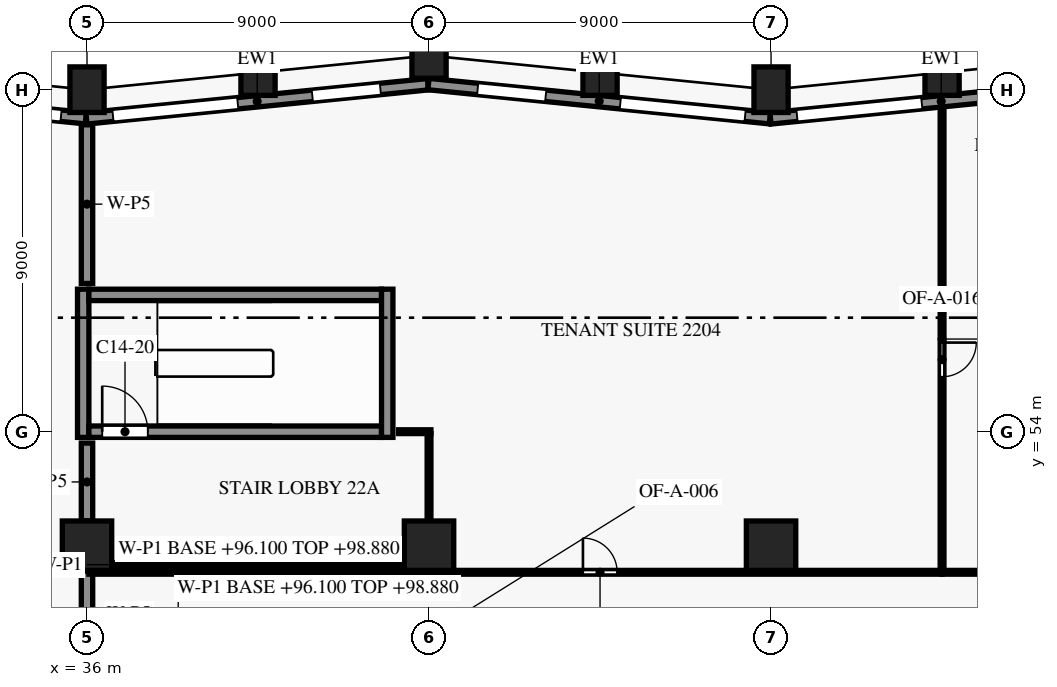
"""IFC4 building model, lengths in metres.
Left out: names, types, materials, properties, quantities, classifications, styles, units other than length and angle.
Written with IfcOpenShell. Run it as: python <this file> out.ifc"""

import sys

from ifc_helpers import new_model, si_unit, direction, frame, frame_2d, origin, origin_2d, place, context, subcontext, project, spatial, rectangle, extrude, element, fill, save


model = new_model("IFC4")
c1 = context("Model", 3, precision=1e-05, world=origin(), true_north=direction((0.0, 1.0)))
c2 = subcontext(c1, "Body", "Model", "MODEL_VIEW")
j1 = project(units=[si_unit("LENGTHUNIT", "METRE"), si_unit("PLANEANGLEUNIT", "RADIAN")], contexts=[c1])
p1 = place(None, origin())
s1 = spatial("IfcSite", under=j1, at=p1, CompositionType="ELEMENT")
p2 = place(p1, origin())
s2 = spatial("IfcBuilding", under=s1, at=p2, CompositionType="ELEMENT")
p3 = place(p2, frame((0.0, 0.0, 96.1)))
s3 = spatial("IfcBuildingStorey", under=s2, at=p3, CompositionType="ELEMENT", Elevation=96.1)
for number, where, z_axis, x_axis in (
    (1, (58.5, 63.45, 0.0), (0.0, 0.0, 1.0), (-0.995, -0.1, 0.0)),
    (2, (54.0, 63.0, 0.0), (0.0, 0.0, 1.0), (-1.0, 0.0, 0.0)),
    (3, (49.5, 63.45, 0.0), (0.0, 0.0, 1.0), (-0.995, 0.1, 0.0)),
    (4, (45.0, 63.9, 0.0), (0.0, 0.0, 1.0), (-1.0, 0.0, 0.0)),
    (5, (40.5, 63.45, 0.0), (0.0, 0.0, 1.0), (-0.995, -0.1, 0.0)),
    (6, (36.0, 63.0, 0.0), (0.0, 0.0, 1.0), (-1.0, 0.0, 0.0)),
):
    element("IfcColumn", number, at=place(p3, frame(where, z_axis=z_axis, x_axis=x_axis)), inside=s3, PredefinedType="COLUMN", context=c2, shape_type="SweptSolid", body=[
        extrude(rectangle(XDim=0.9, YDim=1.2, at=origin_2d()), origin(), (0.0, 0.0, 1.0), 3.8),
    ])
for number, where, z_axis, x_axis in (
    (7, (36.0, 51.0, 0.0), (0.0, 0.0, 1.0), (1.0, 0.0, 0.0)),
    (8, (45.0, 51.0, 0.0), (0.0, 0.0, 1.0), (1.0, 0.0, 0.0)),
    (9, (54.0, 51.0, 0.0), (0.0, 0.0, 1.0), (1.0, 0.0, 0.0)),
):
    element("IfcColumn", number, at=place(p3, frame(where, z_axis=z_axis, x_axis=x_axis)), inside=s3, PredefinedType="COLUMN", context=c2, shape_type="SweptSolid", body=[
        extrude(rectangle(XDim=1.3, YDim=1.3, at=origin_2d()), origin(), (0.0, 0.0, 1.0), 3.8),
    ])
p4 = place(p3, frame((53.985, 62.245, 0.0), z_axis=(0.0, 0.0, 1.0), x_axis=(0.995037993253, 0.099495688264, 0.0)))
e10 = element("IfcWall", 10, at=p4, inside=s3, PredefinedType="SOLIDWALL", context=c2, shape_type="SweptSolid", body=[
    extrude(rectangle(XDim=9.03, YDim=0.3, at=frame_2d((4.515, 0.0))), origin(), (0.0, 0.0, 1.0), 3.15),
])
p5 = place(p4, frame((0.701, 0.0, 0.15)))
e11 = element("IfcOpeningElement", 11, at=p5, cuts=e10, PredefinedType="OPENING", context=c2, shape_type="SweptSolid", body=[
    extrude(rectangle(XDim=3.3, YDim=2.4, at=frame_2d((1.65, 1.2))), frame((0.0, 0.16, 0.0), z_axis=(0.0, -1.0, 0.0), x_axis=(1.0, 0.0, 0.0)), (0.0, 0.0, 1.0), 0.32),
])
p6 = place(p4, frame((5.974, 0.0, 0.75)))
e12 = element("IfcOpeningElement", 12, at=p6, cuts=e10, PredefinedType="OPENING", context=c2, shape_type="SweptSolid", body=[
    extrude(rectangle(XDim=1.8, YDim=1.8, at=frame_2d((0.9, 0.9))), frame((0.0, 0.16, 0.0), z_axis=(0.0, -1.0, 0.0), x_axis=(1.0, 0.0, 0.0)), (0.0, 0.0, 1.0), 0.32),
])
p7 = place(p3, frame((44.985, 63.148, 0.0), z_axis=(0.0, 0.0, 1.0), x_axis=(0.995037993253, -0.099495688264, 0.0)))
e13 = element("IfcWall", 13, at=p7, inside=s3, PredefinedType="SOLIDWALL", context=c2, shape_type="SweptSolid", body=[
    extrude(rectangle(XDim=9.03, YDim=0.3, at=frame_2d((4.515, 0.0))), origin(), (0.0, 0.0, 1.0), 3.15),
])
p8 = place(p7, frame((1.301, 0.0, 0.75)))
e14 = element("IfcOpeningElement", 14, at=p8, cuts=e13, PredefinedType="OPENING", context=c2, shape_type="SweptSolid", body=[
    extrude(rectangle(XDim=1.8, YDim=1.8, at=frame_2d((0.9, 0.9))), frame((0.0, 0.16, 0.0), z_axis=(0.0, -1.0, 0.0), x_axis=(1.0, 0.0, 0.0)), (0.0, 0.0, 1.0), 0.32),
])
p9 = place(p7, frame((5.073, 0.0, 0.15)))
e15 = element("IfcOpeningElement", 15, at=p9, cuts=e13, PredefinedType="OPENING", context=c2, shape_type="SweptSolid", body=[
    extrude(rectangle(XDim=3.3, YDim=2.4, at=frame_2d((1.65, 1.2))), frame((0.0, 0.16, 0.0), z_axis=(0.0, -1.0, 0.0), x_axis=(1.0, 0.0, 0.0)), (0.0, 0.0, 1.0), 0.32),
])
p10 = place(p3, frame((35.985, 62.245, 0.0), z_axis=(0.0, 0.0, 1.0), x_axis=(0.995037993253, 0.099495688264, 0.0)))
e16 = element("IfcWall", 16, at=p10, inside=s3, PredefinedType="SOLIDWALL", context=c2, shape_type="SweptSolid", body=[
    extrude(rectangle(XDim=9.03, YDim=0.3, at=frame_2d((4.515, 0.0))), origin(), (0.0, 0.0, 1.0), 3.15),
])
p11 = place(p10, frame((0.701, 0.0, 0.15)))
e17 = element("IfcOpeningElement", 17, at=p11, cuts=e16, PredefinedType="OPENING", context=c2, shape_type="SweptSolid", body=[
    extrude(rectangle(XDim=3.3, YDim=2.4, at=frame_2d((1.65, 1.2))), frame((0.0, 0.16, 0.0), z_axis=(0.0, -1.0, 0.0), x_axis=(1.0, 0.0, 0.0)), (0.0, 0.0, 1.0), 0.32),
])
p12 = place(p10, frame((5.974, 0.0, 0.75)))
e18 = element("IfcOpeningElement", 18, at=p12, cuts=e16, PredefinedType="OPENING", context=c2, shape_type="SweptSolid", body=[
    extrude(rectangle(XDim=1.8, YDim=1.8, at=frame_2d((0.9, 0.9))), frame((0.0, 0.16, 0.0), z_axis=(0.0, -1.0, 0.0), x_axis=(1.0, 0.0, 0.0)), (0.0, 0.0, 1.0), 0.32),
])
p13 = place(p3, frame((27.075, 63.139, 0.0), z_axis=(0.0, 0.0, 1.0), x_axis=(0.995036108601, -0.099514534519, 0.0)))
e19 = element("IfcWall", 19, at=p13, inside=s3, PredefinedType="SOLIDWALL", context=c2, shape_type="SweptSolid", body=[
    extrude(rectangle(XDim=8.94, YDim=0.3, at=frame_2d((4.47, 0.0))), origin(), (0.0, 0.0, 1.0), 3.15),
])
p14 = place(p13, frame((1.211, 0.0, 0.75)))
e20 = element("IfcOpeningElement", 20, at=p14, cuts=e19, PredefinedType="OPENING", context=c2, shape_type="SweptSolid", body=[
    extrude(rectangle(XDim=1.8, YDim=1.8, at=frame_2d((0.9, 0.9))), frame((0.0, 0.16, 0.0), z_axis=(0.0, -1.0, 0.0), x_axis=(1.0, 0.0, 0.0)), (0.0, 0.0, 1.0), 0.32),
])
p15 = place(p13, frame((4.984, 0.0, 0.15)))
e21 = element("IfcOpeningElement", 21, at=p15, cuts=e19, PredefinedType="OPENING", context=c2, shape_type="SweptSolid", body=[
    extrude(rectangle(XDim=3.3, YDim=2.4, at=frame_2d((1.65, 1.2))), frame((0.0, 0.16, 0.0), z_axis=(0.0, -1.0, 0.0), x_axis=(1.0, 0.0, 0.0)), (0.0, 0.0, 1.0), 0.32),
])
p16 = place(p3, frame((36.05, 54.0, 0.0), z_axis=(0.0, 0.0, 1.0), x_axis=(1.0, 0.0, 0.0)))
e22 = element("IfcWall", 22, at=p16, inside=s3, PredefinedType="SHEAR", context=c2, shape_type="SweptSolid", body=[
    extrude(rectangle(XDim=7.7, YDim=0.3, at=frame_2d((3.85, 0.0))), origin(), (0.0, 0.0, 1.0), 3.5),
])
p17 = place(p16, frame((0.35, 0.0, 0.0)))
e23 = element("IfcOpeningElement", 23, at=p17, cuts=e22, PredefinedType="OPENING", context=c2, shape_type="SweptSolid", body=[
    extrude(rectangle(XDim=1.2, YDim=2.2, at=frame_2d((0.6, 1.1))), frame((0.0, 0.16, 0.0), z_axis=(0.0, -1.0, 0.0), x_axis=(1.0, 0.0, 0.0)), (0.0, 0.0, 1.0), 0.32),
])
p18 = place(p3, frame((36.05, 57.6, 0.0), z_axis=(0.0, 0.0, 1.0), x_axis=(1.0, 0.0, 0.0)))
e24 = element("IfcWall", 24, at=p18, inside=s3, PredefinedType="SHEAR", context=c2, shape_type="SweptSolid", body=[
    extrude(rectangle(XDim=7.7, YDim=0.3, at=frame_2d((3.85, 0.0))), origin(), (0.0, 0.0, 1.0), 3.5),
])
for number, where, z_axis, x_axis in (
    (25, (35.9, 53.85, 0.0), (0.0, 0.0, 1.0), (0.0, 1.0, 0.0)),
    (26, (43.9, 53.85, 0.0), (0.0, 0.0, 1.0), (0.0, 1.0, 0.0)),
):
    element("IfcWall", number, at=place(p3, frame(where, z_axis=z_axis, x_axis=x_axis)), inside=s3, PredefinedType="SHEAR", context=c2, shape_type="SweptSolid", body=[
        extrude(rectangle(XDim=3.9, YDim=0.3, at=frame_2d((1.95, 0.0))), origin(), (0.0, 0.0, 1.0), 3.5),
    ])
p19 = place(p3, frame((36.0, 48.05, 0.0), z_axis=(0.0, 0.0, 1.0), x_axis=(0.0, 1.0, 0.0)))
e27 = element("IfcWall", 27, at=p19, inside=s3, PredefinedType="PARTITIONING", context=c2, shape_type="SweptSolid", body=[
    extrude(rectangle(XDim=2.28, YDim=0.3, at=frame_2d((1.14, 0.0))), origin(), (0.0, 0.0, 1.0), 2.78),
])
p20 = place(p3, frame((36.05, 50.3, 0.0), z_axis=(0.0, 0.0, 1.0), x_axis=(1.0, 0.0, 0.0)))
e28 = element("IfcWall", 28, at=p20, inside=s3, PredefinedType="PARTITIONING", context=c2, shape_type="SweptSolid", body=[
    extrude(rectangle(XDim=8.95, YDim=0.1, at=frame_2d((4.475, 0.0))), origin(), (0.0, 0.0, 1.0), 2.78),
])
p21 = place(p3, frame((45.0, 50.3, 0.0), z_axis=(0.0, 0.0, 1.0), x_axis=(1.0, 0.0, 0.0)))
e29 = element("IfcWall", 29, at=p21, inside=s3, PredefinedType="PARTITIONING", context=c2, shape_type="SweptSolid", body=[
    extrude(rectangle(XDim=13.5, YDim=0.1, at=frame_2d((6.75, 0.0))), origin(), (0.0, 0.0, 1.0), 2.88),
])
p22 = place(p21, frame((4.05, 0.0, 0.0)))
e30 = element("IfcOpeningElement", 30, at=p22, cuts=e29, PredefinedType="OPENING", context=c2, shape_type="SweptSolid", body=[
    extrude(rectangle(XDim=0.9, YDim=2.1, at=frame_2d((0.45, 1.05))), frame((0.0, 0.06, 0.0), z_axis=(0.0, -1.0, 0.0), x_axis=(1.0, 0.0, 0.0)), (0.0, 0.0, 1.0), 0.12),
])
p23 = place(p3, frame((58.5, 50.3, 0.0), z_axis=(0.0, 0.0, 1.0), x_axis=(1.0, 0.0, 0.0)))
e31 = element("IfcWall", 31, at=p23, inside=s3, PredefinedType="PARTITIONING", context=c2, shape_type="SweptSolid", body=[
    extrude(rectangle(XDim=4.5, YDim=0.1, at=frame_2d((2.25, 0.0))), origin(), (0.0, 0.0, 1.0), 2.88),
])
p24 = place(p3, frame((44.345, 50.5, 0.0), z_axis=(0.0, 0.0, 1.0), x_axis=(-1.0, 0.0, 0.0)))
e32 = element("IfcWall", 32, at=p24, inside=s3, PredefinedType="PARTITIONING", context=c2, shape_type="SweptSolid", body=[
    extrude(rectangle(XDim=7.69, YDim=0.1, at=frame_2d((3.845, 0.0))), origin(), (0.0, 0.0, 1.0), 3.48),
])
p25 = place(p3, frame((36.0, 51.655, 0.0), z_axis=(0.0, 0.0, 1.0), x_axis=(0.0, 1.0, 0.0)))
e33 = element("IfcWall", 33, at=p25, inside=s3, PredefinedType="PARTITIONING", context=c2, shape_type="SweptSolid", body=[
    extrude(rectangle(XDim=2.045, YDim=0.3, at=frame_2d((1.022, 0.0))), origin(), (0.0, 0.0, 1.0), 2.78),
])
p26 = place(p3, frame((45.0, 53.95, 0.0), z_axis=(0.0, 0.0, 1.0), x_axis=(0.0, -1.0, 0.0)))
e34 = element("IfcWall", 34, at=p26, inside=s3, PredefinedType="PARTITIONING", context=c2, shape_type="SweptSolid", body=[
    extrude(rectangle(XDim=2.295, YDim=0.1, at=frame_2d((1.147, 0.0))), origin(), (0.0, 0.0, 1.0), 2.88),
])
p27 = place(p3, frame((44.2, 54.0, 0.0), z_axis=(0.0, 0.0, 1.0), x_axis=(1.0, 0.0, 0.0)))
e35 = element("IfcWall", 35, at=p27, inside=s3, PredefinedType="PARTITIONING", context=c2, shape_type="SweptSolid", body=[
    extrude(rectangle(XDim=0.85, YDim=0.1, at=frame_2d((0.425, 0.0))), origin(), (0.0, 0.0, 1.0), 2.88),
])
p28 = place(p3, frame((36.0, 57.9, 0.0), z_axis=(0.0, 0.0, 1.0), x_axis=(0.0, 1.0, 0.0)))
e36 = element("IfcWall", 36, at=p28, inside=s3, PredefinedType="PARTITIONING", context=c2, shape_type="SweptSolid", body=[
    extrude(rectangle(XDim=4.176, YDim=0.3, at=frame_2d((2.088, 0.0))), origin(), (0.0, 0.0, 1.0), 2.78),
])
p29 = place(p3, frame((58.5, 62.525, 0.0), z_axis=(0.0, 0.0, 1.0), x_axis=(0.0, -1.0, 0.0)))
e37 = element("IfcWall", 37, at=p29, inside=s3, PredefinedType="PARTITIONING", context=c2, shape_type="SweptSolid", body=[
    extrude(rectangle(XDim=12.175, YDim=0.1, at=frame_2d((6.088, 0.0))), origin(), (0.0, 0.0, 1.0), 2.78),
])
p30 = place(p29, frame((6.18, 0.0, 0.0)))
e38 = element("IfcOpeningElement", 38, at=p30, cuts=e37, PredefinedType="OPENING", context=c2, shape_type="SweptSolid", body=[
    extrude(rectangle(XDim=0.9, YDim=2.1, at=frame_2d((0.45, 1.05))), frame((0.0, 0.06, 0.0), z_axis=(0.0, -1.0, 0.0), x_axis=(1.0, 0.0, 0.0)), (0.0, 0.0, 1.0), 0.12),
])
p31 = place(p5, origin())
e39 = element("IfcWindow", 39, at=p31, inside=s3, PartitioningType="SINGLE_PANEL", PredefinedType="WINDOW", context=c2, shape_type="SweptSolid", body=[
    extrude(rectangle(XDim=3.3, YDim=2.4, at=frame_2d((1.65, 1.2))), frame((0.0, 0.03, 0.0), z_axis=(0.0, -1.0, 0.0), x_axis=(1.0, 0.0, 0.0)), (0.0, 0.0, 1.0), 0.06),
])
fill(e11, e39)
p32 = place(p8, origin())
e40 = element("IfcWindow", 40, at=p32, inside=s3, PartitioningType="SINGLE_PANEL", PredefinedType="WINDOW", context=c2, shape_type="SweptSolid", body=[
    extrude(rectangle(XDim=1.8, YDim=1.8, at=frame_2d((0.9, 0.9))), frame((0.0, 0.03, 0.0), z_axis=(0.0, -1.0, 0.0), x_axis=(1.0, 0.0, 0.0)), (0.0, 0.0, 1.0), 0.06),
])
fill(e14, e40)
p33 = place(p9, origin())
e41 = element("IfcWindow", 41, at=p33, inside=s3, PartitioningType="SINGLE_PANEL", PredefinedType="WINDOW", context=c2, shape_type="SweptSolid", body=[
    extrude(rectangle(XDim=3.3, YDim=2.4, at=frame_2d((1.65, 1.2))), frame((0.0, 0.03, 0.0), z_axis=(0.0, -1.0, 0.0), x_axis=(1.0, 0.0, 0.0)), (0.0, 0.0, 1.0), 0.06),
])
fill(e15, e41)
p34 = place(p11, origin())
e42 = element("IfcWindow", 42, at=p34, inside=s3, PartitioningType="SINGLE_PANEL", PredefinedType="WINDOW", context=c2, shape_type="SweptSolid", body=[
    extrude(rectangle(XDim=3.3, YDim=2.4, at=frame_2d((1.65, 1.2))), frame((0.0, 0.03, 0.0), z_axis=(0.0, -1.0, 0.0), x_axis=(1.0, 0.0, 0.0)), (0.0, 0.0, 1.0), 0.06),
])
fill(e17, e42)
p35 = place(p12, origin())
e43 = element("IfcWindow", 43, at=p35, inside=s3, PartitioningType="SINGLE_PANEL", PredefinedType="WINDOW", context=c2, shape_type="SweptSolid", body=[
    extrude(rectangle(XDim=1.8, YDim=1.8, at=frame_2d((0.9, 0.9))), frame((0.0, 0.03, 0.0), z_axis=(0.0, -1.0, 0.0), x_axis=(1.0, 0.0, 0.0)), (0.0, 0.0, 1.0), 0.06),
])
fill(e18, e43)
p36 = place(p15, origin())
e44 = element("IfcWindow", 44, at=p36, inside=s3, PartitioningType="SINGLE_PANEL", PredefinedType="WINDOW", context=c2, shape_type="SweptSolid", body=[
    extrude(rectangle(XDim=3.3, YDim=2.4, at=frame_2d((1.65, 1.2))), frame((0.0, 0.03, 0.0), z_axis=(0.0, -1.0, 0.0), x_axis=(1.0, 0.0, 0.0)), (0.0, 0.0, 1.0), 0.06),
])
fill(e21, e44)
p37 = place(p17, origin())
e45 = element("IfcDoor", 45, at=p37, inside=s3, OperationType="SINGLE_SWING_LEFT", PredefinedType="DOOR", context=c2, shape_type="SweptSolid", body=[
    extrude(rectangle(XDim=1.2, YDim=2.2, at=frame_2d((0.6, 1.1))), frame((0.0, 0.025, 0.0), z_axis=(0.0, -1.0, 0.0), x_axis=(1.0, 0.0, 0.0)), (0.0, 0.0, 1.0), 0.05),
])
fill(e23, e45)
p38 = place(p22, origin())
e46 = element("IfcDoor", 46, at=p38, inside=s3, OperationType="SINGLE_SWING_LEFT", PredefinedType="DOOR", context=c2, shape_type="SweptSolid", body=[
    extrude(rectangle(XDim=0.9, YDim=2.1, at=frame_2d((0.45, 1.05))), frame((0.0, 0.025, 0.0), z_axis=(0.0, -1.0, 0.0), x_axis=(1.0, 0.0, 0.0)), (0.0, 0.0, 1.0), 0.05),
])
fill(e30, e46)
p39 = place(p30, origin())
e47 = element("IfcDoor", 47, at=p39, inside=s3, OperationType="SINGLE_SWING_LEFT", PredefinedType="DOOR", context=c2, shape_type="SweptSolid", body=[
    extrude(rectangle(XDim=0.9, YDim=2.1, at=frame_2d((0.45, 1.05))), frame((0.0, 0.025, 0.0), z_axis=(0.0, -1.0, 0.0), x_axis=(1.0, 0.0, 0.0)), (0.0, 0.0, 1.0), 0.05),
])
fill(e38, e47)
save(model, sys.argv[1])
